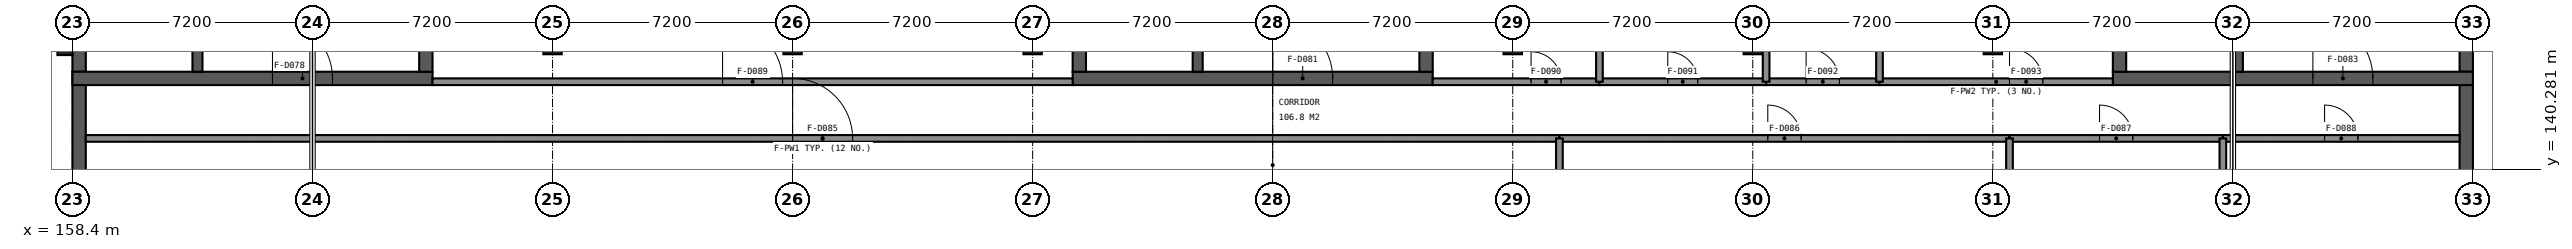
"""IFC4 building model, lengths in metres.
Left out: names, types, materials, properties, quantities, classifications, styles, units other than length and angle.
Written with IfcOpenShell. Run it as: python <this file> out.ifc"""

import sys

from ifc_helpers import new_model, si_unit, direction, frame, frame_2d, origin, origin_2d, place, context, subcontext, project, spatial, rectangle, extrude, element, fill, save


model = new_model("IFC4")
c1 = context("Model", 3, precision=1e-05, world=origin(), true_north=direction((0.0, 1.0)))
c2 = subcontext(c1, "Body", "Model", "MODEL_VIEW")
j1 = project(units=[si_unit("LENGTHUNIT", "METRE"), si_unit("PLANEANGLEUNIT", "RADIAN")], contexts=[c1])
p1 = place(None, origin())
s1 = spatial("IfcSite", under=j1, at=p1, CompositionType="ELEMENT")
p2 = place(p1, origin())
s2 = spatial("IfcBuilding", under=s1, at=p2, CompositionType="ELEMENT")
p3 = place(p2, frame((0.0, 0.0, 14.4)))
s3 = spatial("IfcBuildingStorey", under=s2, at=p3, CompositionType="ELEMENT", Elevation=14.4)
for number, where, z_axis, x_axis in (
    (1, (172.8, 144.0, 0.0), (0.0, 0.0, 1.0), (1.0, 0.0, 0.0)),
    (2, (180.0, 144.0, 0.0), (0.0, 0.0, 1.0), (1.0, 0.0, 0.0)),
    (3, (187.2, 144.0, 0.0), (0.0, 0.0, 1.0), (1.0, 0.0, 0.0)),
    (4, (201.6, 144.0, 0.0), (0.0, 0.0, 1.0), (1.0, 0.0, 0.0)),
    (5, (208.8, 144.0, 0.0), (0.0, 0.0, 1.0), (1.0, 0.0, 0.0)),
    (6, (216.0, 144.0, 0.0), (0.0, 0.0, 1.0), (1.0, 0.0, 0.0)),
):
    element("IfcColumn", number, at=place(p3, frame(where, z_axis=z_axis, x_axis=x_axis)), inside=s3, PredefinedType="COLUMN", context=c2, shape_type="SweptSolid", body=[
        extrude(rectangle(XDim=0.55, YDim=0.55, at=origin_2d()), origin(), (0.0, 0.0, 1.0), 4.8),
    ])
p4 = place(p3, frame((158.6, 137.075, 0.0), z_axis=(0.0, 0.0, 1.0), x_axis=(0.0, 1.0, 0.0)))
e7 = element("IfcWall", 7, at=p4, inside=s3, PredefinedType="SHEAR", context=c2, shape_type="SweptSolid", body=[
    extrude(rectangle(XDim=6.125, YDim=0.4, at=frame_2d((3.062, 0.0))), origin(), (0.0, 0.0, 1.0), 3.95),
])
p5 = place(p4, frame((1.262, 0.0, 1.8)))
e8 = element("IfcOpeningElement", 8, at=p5, cuts=e7, PredefinedType="OPENING", context=c2, shape_type="SweptSolid", body=[
    extrude(rectangle(XDim=1.2, YDim=1.2, at=frame_2d((0.6, 0.6))), frame((0.0, 0.21, 0.0), z_axis=(0.0, -1.0, 0.0), x_axis=(1.0, 0.0, 0.0)), (0.0, 0.0, 1.0), 0.42),
])
p6 = place(p3, frame((158.6, 143.2, 0.0), z_axis=(0.0, 0.0, 1.0), x_axis=(0.0, 1.0, 0.0)))
e9 = element("IfcWall", 9, at=p6, inside=s3, PredefinedType="SHEAR", context=c2, shape_type="SweptSolid", body=[
    extrude(rectangle(XDim=7.6, YDim=0.4, at=frame_2d((3.8, 0.0))), origin(), (0.0, 0.0, 1.0), 4.55),
])
p7 = place(p3, frame((230.2, 143.2, 0.0), z_axis=(0.0, 0.0, 1.0), x_axis=(0.0, -1.0, 0.0)))
e10 = element("IfcWall", 10, at=p7, inside=s3, PredefinedType="SHEAR", context=c2, shape_type="SweptSolid", body=[
    extrude(rectangle(XDim=6.125, YDim=0.4, at=frame_2d((3.062, 0.0))), origin(), (0.0, 0.0, 1.0), 3.95),
])
p8 = place(p7, frame((3.663, 0.0, 1.8)))
e11 = element("IfcOpeningElement", 11, at=p8, cuts=e10, PredefinedType="OPENING", context=c2, shape_type="SweptSolid", body=[
    extrude(rectangle(XDim=1.2, YDim=1.2, at=frame_2d((0.6, 0.6))), frame((0.0, 0.21, 0.0), z_axis=(0.0, -1.0, 0.0), x_axis=(1.0, 0.0, 0.0)), (0.0, 0.0, 1.0), 0.42),
])
p9 = place(p3, frame((230.2, 150.8, 0.0), z_axis=(0.0, 0.0, 1.0), x_axis=(0.0, -1.0, 0.0)))
e12 = element("IfcWall", 12, at=p9, inside=s3, PredefinedType="SHEAR", context=c2, shape_type="SweptSolid", body=[
    extrude(rectangle(XDim=7.6, YDim=0.4, at=frame_2d((3.8, 0.0))), origin(), (0.0, 0.0, 1.0), 4.55),
])
p10 = place(p3, frame((158.4, 143.0, 0.0), z_axis=(0.0, 0.0, 1.0), x_axis=(1.0, 0.0, 0.0)))
e13 = element("IfcWall", 13, at=p10, inside=s3, PredefinedType="SHEAR", context=c2, shape_type="SweptSolid", body=[
    extrude(rectangle(XDim=10.8, YDim=0.4, at=frame_2d((5.4, 0.0))), origin(), (0.0, 0.0, 1.0), 4.55),
])
p11 = place(p10, frame((6.0, 0.0, 0.0)))
e14 = element("IfcOpeningElement", 14, at=p11, cuts=e13, PredefinedType="OPENING", context=c2, shape_type="SweptSolid", body=[
    extrude(rectangle(XDim=1.8, YDim=2.1, at=frame_2d((0.9, 1.05))), frame((0.0, 0.21, 0.0), z_axis=(0.0, -1.0, 0.0), x_axis=(1.0, 0.0, 0.0)), (0.0, 0.0, 1.0), 0.42),
])
p12 = place(p3, frame((169.0, 143.2, 0.0), z_axis=(0.0, 0.0, 1.0), x_axis=(0.0, 1.0, 0.0)))
e15 = element("IfcWall", 15, at=p12, inside=s3, PredefinedType="SHEAR", context=c2, shape_type="SweptSolid", body=[
    extrude(rectangle(XDim=7.6, YDim=0.4, at=frame_2d((3.8, 0.0))), origin(), (0.0, 0.0, 1.0), 4.55),
])
p13 = place(p3, frame((162.15, 143.2, 0.0), z_axis=(0.0, 0.0, 1.0), x_axis=(0.0, 1.0, 0.0)))
e16 = element("IfcWall", 16, at=p13, inside=s3, PredefinedType="SHEAR", context=c2, shape_type="SweptSolid", body=[
    extrude(rectangle(XDim=7.6, YDim=0.3, at=frame_2d((3.8, 0.0))), origin(), (0.0, 0.0, 1.0), 4.55),
])
p14 = place(p13, frame((6.35, 0.0, 0.0)))
e17 = element("IfcOpeningElement", 17, at=p14, cuts=e16, PredefinedType="OPENING", context=c2, shape_type="SweptSolid", body=[
    extrude(rectangle(XDim=1.0, YDim=2.1, at=frame_2d((0.5, 1.05))), frame((0.0, 0.16, 0.0), z_axis=(0.0, -1.0, 0.0), x_axis=(1.0, 0.0, 0.0)), (0.0, 0.0, 1.0), 0.32),
])
p15 = place(p3, frame((188.4, 143.0, 0.0), z_axis=(0.0, 0.0, 1.0), x_axis=(1.0, 0.0, 0.0)))
e18 = element("IfcWall", 18, at=p15, inside=s3, PredefinedType="SHEAR", context=c2, shape_type="SweptSolid", body=[
    extrude(rectangle(XDim=10.8, YDim=0.4, at=frame_2d((5.4, 0.0))), origin(), (0.0, 0.0, 1.0), 4.55),
])
p16 = place(p15, frame((6.0, 0.0, 0.0)))
e19 = element("IfcOpeningElement", 19, at=p16, cuts=e18, PredefinedType="OPENING", context=c2, shape_type="SweptSolid", body=[
    extrude(rectangle(XDim=1.8, YDim=2.1, at=frame_2d((0.9, 1.05))), frame((0.0, 0.21, 0.0), z_axis=(0.0, -1.0, 0.0), x_axis=(1.0, 0.0, 0.0)), (0.0, 0.0, 1.0), 0.42),
])
for number, where, z_axis, x_axis in (
    (20, (188.6, 143.2, 0.0), (0.0, 0.0, 1.0), (0.0, 1.0, 0.0)),
    (21, (199.0, 143.2, 0.0), (0.0, 0.0, 1.0), (0.0, 1.0, 0.0)),
):
    element("IfcWall", number, at=place(p3, frame(where, z_axis=z_axis, x_axis=x_axis)), inside=s3, PredefinedType="SHEAR", context=c2, shape_type="SweptSolid", body=[
        extrude(rectangle(XDim=7.6, YDim=0.4, at=frame_2d((3.8, 0.0))), origin(), (0.0, 0.0, 1.0), 4.55),
    ])
p17 = place(p3, frame((192.15, 143.2, 0.0), z_axis=(0.0, 0.0, 1.0), x_axis=(0.0, 1.0, 0.0)))
e22 = element("IfcWall", 22, at=p17, inside=s3, PredefinedType="SHEAR", context=c2, shape_type="SweptSolid", body=[
    extrude(rectangle(XDim=7.6, YDim=0.3, at=frame_2d((3.8, 0.0))), origin(), (0.0, 0.0, 1.0), 4.55),
])
p18 = place(p17, frame((6.35, 0.0, 0.0)))
e23 = element("IfcOpeningElement", 23, at=p18, cuts=e22, PredefinedType="OPENING", context=c2, shape_type="SweptSolid", body=[
    extrude(rectangle(XDim=1.0, YDim=2.1, at=frame_2d((0.5, 1.05))), frame((0.0, 0.16, 0.0), z_axis=(0.0, -1.0, 0.0), x_axis=(1.0, 0.0, 0.0)), (0.0, 0.0, 1.0), 0.32),
])
p19 = place(p3, frame((219.6, 143.0, 0.0), z_axis=(0.0, 0.0, 1.0), x_axis=(1.0, 0.0, 0.0)))
e24 = element("IfcWall", 24, at=p19, inside=s3, PredefinedType="SHEAR", context=c2, shape_type="SweptSolid", body=[
    extrude(rectangle(XDim=10.8, YDim=0.4, at=frame_2d((5.4, 0.0))), origin(), (0.0, 0.0, 1.0), 4.55),
])
p20 = place(p19, frame((6.0, 0.0, 0.0)))
e25 = element("IfcOpeningElement", 25, at=p20, cuts=e24, PredefinedType="OPENING", context=c2, shape_type="SweptSolid", body=[
    extrude(rectangle(XDim=1.8, YDim=2.1, at=frame_2d((0.9, 1.05))), frame((0.0, 0.21, 0.0), z_axis=(0.0, -1.0, 0.0), x_axis=(1.0, 0.0, 0.0)), (0.0, 0.0, 1.0), 0.42),
])
p21 = place(p3, frame((219.8, 143.2, 0.0), z_axis=(0.0, 0.0, 1.0), x_axis=(0.0, 1.0, 0.0)))
e26 = element("IfcWall", 26, at=p21, inside=s3, PredefinedType="SHEAR", context=c2, shape_type="SweptSolid", body=[
    extrude(rectangle(XDim=7.6, YDim=0.4, at=frame_2d((3.8, 0.0))), origin(), (0.0, 0.0, 1.0), 4.55),
])
p22 = place(p3, frame((223.35, 143.2, 0.0), z_axis=(0.0, 0.0, 1.0), x_axis=(0.0, 1.0, 0.0)))
e27 = element("IfcWall", 27, at=p22, inside=s3, PredefinedType="SHEAR", context=c2, shape_type="SweptSolid", body=[
    extrude(rectangle(XDim=7.6, YDim=0.3, at=frame_2d((3.8, 0.0))), origin(), (0.0, 0.0, 1.0), 4.55),
])
p23 = place(p22, frame((6.35, 0.0, 0.0)))
e28 = element("IfcOpeningElement", 28, at=p23, cuts=e27, PredefinedType="OPENING", context=c2, shape_type="SweptSolid", body=[
    extrude(rectangle(XDim=1.0, YDim=2.1, at=frame_2d((0.5, 1.05))), frame((0.0, 0.16, 0.0), z_axis=(0.0, -1.0, 0.0), x_axis=(1.0, 0.0, 0.0)), (0.0, 0.0, 1.0), 0.32),
])
for number, where, z_axis, x_axis in (
    (29, (158.6, 130.0, 4.8), (0.0, 0.0, 1.0), (0.0, 1.0, 0.0)),
    (30, (230.2, 150.8, 4.8), (0.0, 0.0, 1.0), (0.0, -1.0, 0.0)),
):
    element("IfcWall", number, at=place(p3, frame(where, z_axis=z_axis, x_axis=x_axis)), inside=s3, PredefinedType="SOLIDWALL", context=c2, shape_type="SweptSolid", body=[
        extrude(rectangle(XDim=20.8, YDim=0.4, at=frame_2d((10.4, 0.0))), origin(), (0.0, 0.0, 1.0), 0.45),
    ])
p24 = place(p3, frame((158.175, 144.0, 0.0), z_axis=(0.0, 0.0, 1.0), x_axis=(0.0, 1.0, 0.0)))
e31 = element("IfcColumn", 31, at=p24, inside=s3, PredefinedType="PILASTER", context=c2, shape_type="SweptSolid", body=[
    extrude(rectangle(XDim=0.6, YDim=0.45, at=origin_2d()), origin(), (0.0, 0.0, 1.0), 4.05),
])
p25 = place(p3, frame((157.9, 129.6, 4.5), z_axis=(0.0, 0.0, 1.0), x_axis=(0.0, 1.0, 0.0)))
e32 = element("IfcWall", 32, at=p25, inside=s3, PredefinedType="SOLIDWALL", context=c2, shape_type="SweptSolid", body=[
    extrude(rectangle(XDim=21.6, YDim=0.2, at=frame_2d((10.8, 0.0))), origin(), (0.0, 0.0, 1.0), 0.45),
])
p26 = place(p3, frame((158.8, 141.2, 0.0), z_axis=(0.0, 0.0, 1.0), x_axis=(1.0, 0.0, 0.0)))
e33 = element("IfcWall", 33, at=p26, inside=s3, PredefinedType="PARTITIONING", context=c2, shape_type="SweptSolid", body=[
    extrude(rectangle(XDim=44.2, YDim=0.2, at=frame_2d((22.1, 0.0))), origin(), (0.0, 0.0, 1.0), 3.95),
])
p27 = place(p26, frame((21.2, 0.0, 0.0)))
e34 = element("IfcOpeningElement", 34, at=p27, cuts=e33, PredefinedType="OPENING", context=c2, shape_type="SweptSolid", body=[
    extrude(rectangle(XDim=1.8, YDim=2.1, at=frame_2d((0.9, 1.05))), frame((0.0, 0.11, 0.0), z_axis=(0.0, -1.0, 0.0), x_axis=(1.0, 0.0, 0.0)), (0.0, 0.0, 1.0), 0.22),
])
p28 = place(p3, frame((203.0, 141.2, 0.0), z_axis=(0.0, 0.0, 1.0), x_axis=(1.0, 0.0, 0.0)))
e35 = element("IfcWall", 35, at=p28, inside=s3, PredefinedType="PARTITIONING", context=c2, shape_type="SweptSolid", body=[
    extrude(rectangle(XDim=13.5, YDim=0.2, at=frame_2d((6.75, 0.0))), origin(), (0.0, 0.0, 1.0), 3.95),
])
p29 = place(p28, frame((6.25, 0.0, 0.0)))
e36 = element("IfcOpeningElement", 36, at=p29, cuts=e35, PredefinedType="OPENING", context=c2, shape_type="SweptSolid", body=[
    extrude(rectangle(XDim=1.0, YDim=2.1, at=frame_2d((0.5, 1.05))), frame((0.0, 0.11, 0.0), z_axis=(0.0, -1.0, 0.0), x_axis=(1.0, 0.0, 0.0)), (0.0, 0.0, 1.0), 0.22),
])
p30 = place(p3, frame((216.5, 141.2, 0.0), z_axis=(0.0, 0.0, 1.0), x_axis=(1.0, 0.0, 0.0)))
e37 = element("IfcWall", 37, at=p30, inside=s3, PredefinedType="PARTITIONING", context=c2, shape_type="SweptSolid", body=[
    extrude(rectangle(XDim=6.4, YDim=0.2, at=frame_2d((3.2, 0.0))), origin(), (0.0, 0.0, 1.0), 3.95),
])
p31 = place(p30, frame((2.7, 0.0, 0.0)))
e38 = element("IfcOpeningElement", 38, at=p31, cuts=e37, PredefinedType="OPENING", context=c2, shape_type="SweptSolid", body=[
    extrude(rectangle(XDim=1.0, YDim=2.1, at=frame_2d((0.5, 1.05))), frame((0.0, 0.11, 0.0), z_axis=(0.0, -1.0, 0.0), x_axis=(1.0, 0.0, 0.0)), (0.0, 0.0, 1.0), 0.22),
])
p32 = place(p3, frame((222.9, 141.2, 0.0), z_axis=(0.0, 0.0, 1.0), x_axis=(1.0, 0.0, 0.0)))
e39 = element("IfcWall", 39, at=p32, inside=s3, PredefinedType="PARTITIONING", context=c2, shape_type="SweptSolid", body=[
    extrude(rectangle(XDim=7.1, YDim=0.2, at=frame_2d((3.55, 0.0))), origin(), (0.0, 0.0, 1.0), 3.95),
])
p33 = place(p32, frame((3.05, 0.0, 0.0)))
e40 = element("IfcOpeningElement", 40, at=p33, cuts=e39, PredefinedType="OPENING", context=c2, shape_type="SweptSolid", body=[
    extrude(rectangle(XDim=1.0, YDim=2.1, at=frame_2d((0.5, 1.05))), frame((0.0, 0.11, 0.0), z_axis=(0.0, -1.0, 0.0), x_axis=(1.0, 0.0, 0.0)), (0.0, 0.0, 1.0), 0.22),
])
p34 = place(p3, frame((169.2, 142.9, 0.0), z_axis=(0.0, 0.0, 1.0), x_axis=(1.0, 0.0, 0.0)))
e41 = element("IfcWall", 41, at=p34, inside=s3, PredefinedType="PARTITIONING", context=c2, shape_type="SweptSolid", body=[
    extrude(rectangle(XDim=19.2, YDim=0.2, at=frame_2d((9.6, 0.0))), origin(), (0.0, 0.0, 1.0), 3.95),
])
p35 = place(p34, frame((8.7, 0.0, 0.0)))
e42 = element("IfcOpeningElement", 42, at=p35, cuts=e41, PredefinedType="OPENING", context=c2, shape_type="SweptSolid", body=[
    extrude(rectangle(XDim=1.8, YDim=2.1, at=frame_2d((0.9, 1.05))), frame((0.0, 0.11, 0.0), z_axis=(0.0, -1.0, 0.0), x_axis=(1.0, 0.0, 0.0)), (0.0, 0.0, 1.0), 0.22),
])
p36 = place(p3, frame((199.2, 142.9, 0.0), z_axis=(0.0, 0.0, 1.0), x_axis=(1.0, 0.0, 0.0)))
e43 = element("IfcWall", 43, at=p36, inside=s3, PredefinedType="PARTITIONING", context=c2, shape_type="SweptSolid", body=[
    extrude(rectangle(XDim=5.0, YDim=0.2, at=frame_2d((2.5, 0.0))), origin(), (0.0, 0.0, 1.0), 3.95),
])
p37 = place(p36, frame((2.95, 0.0, 0.0)))
e44 = element("IfcOpeningElement", 44, at=p37, cuts=e43, PredefinedType="OPENING", context=c2, shape_type="SweptSolid", body=[
    extrude(rectangle(XDim=0.9, YDim=2.1, at=frame_2d((0.45, 1.05))), frame((0.0, 0.11, 0.0), z_axis=(0.0, -1.0, 0.0), x_axis=(1.0, 0.0, 0.0)), (0.0, 0.0, 1.0), 0.22),
])
p38 = place(p3, frame((204.2, 142.9, 0.0), z_axis=(0.0, 0.0, 1.0), x_axis=(1.0, 0.0, 0.0)))
e45 = element("IfcWall", 45, at=p38, inside=s3, PredefinedType="PARTITIONING", context=c2, shape_type="SweptSolid", body=[
    extrude(rectangle(XDim=5.0, YDim=0.2, at=frame_2d((2.5, 0.0))), origin(), (0.0, 0.0, 1.0), 3.95),
])
p39 = place(p38, frame((2.05, 0.0, 0.0)))
e46 = element("IfcOpeningElement", 46, at=p39, cuts=e45, PredefinedType="OPENING", context=c2, shape_type="SweptSolid", body=[
    extrude(rectangle(XDim=0.9, YDim=2.1, at=frame_2d((0.45, 1.05))), frame((0.0, 0.11, 0.0), z_axis=(0.0, -1.0, 0.0), x_axis=(1.0, 0.0, 0.0)), (0.0, 0.0, 1.0), 0.22),
])
p40 = place(p3, frame((209.2, 142.9, 0.0), z_axis=(0.0, 0.0, 1.0), x_axis=(1.0, 0.0, 0.0)))
e47 = element("IfcWall", 47, at=p40, inside=s3, PredefinedType="PARTITIONING", context=c2, shape_type="SweptSolid", body=[
    extrude(rectangle(XDim=3.4, YDim=0.2, at=frame_2d((1.7, 0.0))), origin(), (0.0, 0.0, 1.0), 3.95),
])
p41 = place(p40, frame((1.2, 0.0, 0.0)))
e48 = element("IfcOpeningElement", 48, at=p41, cuts=e47, PredefinedType="OPENING", context=c2, shape_type="SweptSolid", body=[
    extrude(rectangle(XDim=1.0, YDim=2.1, at=frame_2d((0.5, 1.05))), frame((0.0, 0.11, 0.0), z_axis=(0.0, -1.0, 0.0), x_axis=(1.0, 0.0, 0.0)), (0.0, 0.0, 1.0), 0.22),
])
p42 = place(p3, frame((212.6, 142.9, 0.0), z_axis=(0.0, 0.0, 1.0), x_axis=(1.0, 0.0, 0.0)))
e49 = element("IfcWall", 49, at=p42, inside=s3, PredefinedType="PARTITIONING", context=c2, shape_type="SweptSolid", body=[
    extrude(rectangle(XDim=7.0, YDim=0.2, at=frame_2d((3.5, 0.0))), origin(), (0.0, 0.0, 1.0), 3.95),
])
p43 = place(p42, frame((3.9, 0.0, 0.0)))
e50 = element("IfcOpeningElement", 50, at=p43, cuts=e49, PredefinedType="OPENING", context=c2, shape_type="SweptSolid", body=[
    extrude(rectangle(XDim=1.0, YDim=2.1, at=frame_2d((0.5, 1.05))), frame((0.0, 0.11, 0.0), z_axis=(0.0, -1.0, 0.0), x_axis=(1.0, 0.0, 0.0)), (0.0, 0.0, 1.0), 0.22),
])
p44 = place(p3, frame((203.0, 130.0, 0.0), z_axis=(0.0, 0.0, 1.0), x_axis=(0.0, 1.0, 0.0)))
e51 = element("IfcWall", 51, at=p44, inside=s3, PredefinedType="PARTITIONING", context=c2, shape_type="SweptSolid", body=[
    extrude(rectangle(XDim=11.2, YDim=0.2, at=frame_2d((5.6, 0.0))), origin(), (0.0, 0.0, 1.0), 3.95),
])
for number, where, z_axis, x_axis in (
    (52, (204.2, 142.9, 0.0), (0.0, 0.0, 1.0), (0.0, 1.0, 0.0)),
    (53, (209.2, 142.9, 0.0), (0.0, 0.0, 1.0), (0.0, 1.0, 0.0)),
    (54, (212.6, 142.9, 0.0), (0.0, 0.0, 1.0), (0.0, 1.0, 0.0)),
):
    element("IfcWall", number, at=place(p3, frame(where, z_axis=z_axis, x_axis=x_axis)), inside=s3, PredefinedType="PARTITIONING", context=c2, shape_type="SweptSolid", body=[
        extrude(rectangle(XDim=7.9, YDim=0.2, at=frame_2d((3.95, 0.0))), origin(), (0.0, 0.0, 1.0), 3.95),
    ])
for number, where, z_axis, x_axis in (
    (55, (216.5, 130.0, 0.0), (0.0, 0.0, 1.0), (0.0, 1.0, 0.0)),
    (56, (222.9, 130.0, 0.0), (0.0, 0.0, 1.0), (0.0, 1.0, 0.0)),
):
    element("IfcWall", number, at=place(p3, frame(where, z_axis=z_axis, x_axis=x_axis)), inside=s3, PredefinedType="PARTITIONING", context=c2, shape_type="SweptSolid", body=[
        extrude(rectangle(XDim=11.2, YDim=0.2, at=frame_2d((5.6, 0.0))), origin(), (0.0, 0.0, 1.0), 3.95),
    ])
p45 = place(p11, origin())
e57 = element("IfcDoor", 57, at=p45, inside=s3, OperationType="NOTDEFINED", PredefinedType="DOOR", context=c2, shape_type="SweptSolid", body=[
    extrude(rectangle(XDim=1.8, YDim=2.1, at=frame_2d((0.9, 1.05))), frame((0.0, 0.025, 0.0), z_axis=(0.0, -1.0, 0.0), x_axis=(1.0, 0.0, 0.0)), (0.0, 0.0, 1.0), 0.05),
])
fill(e14, e57)
p46 = place(p16, origin())
e58 = element("IfcDoor", 58, at=p46, inside=s3, OperationType="NOTDEFINED", PredefinedType="DOOR", context=c2, shape_type="SweptSolid", body=[
    extrude(rectangle(XDim=1.8, YDim=2.1, at=frame_2d((0.9, 1.05))), frame((0.0, 0.025, 0.0), z_axis=(0.0, -1.0, 0.0), x_axis=(1.0, 0.0, 0.0)), (0.0, 0.0, 1.0), 0.05),
])
fill(e19, e58)
p47 = place(p20, origin())
e59 = element("IfcDoor", 59, at=p47, inside=s3, OperationType="NOTDEFINED", PredefinedType="DOOR", context=c2, shape_type="SweptSolid", body=[
    extrude(rectangle(XDim=1.8, YDim=2.1, at=frame_2d((0.9, 1.05))), frame((0.0, 0.025, 0.0), z_axis=(0.0, -1.0, 0.0), x_axis=(1.0, 0.0, 0.0)), (0.0, 0.0, 1.0), 0.05),
])
fill(e25, e59)
p48 = place(p27, origin())
e60 = element("IfcDoor", 60, at=p48, inside=s3, OperationType="NOTDEFINED", PredefinedType="DOOR", context=c2, shape_type="SweptSolid", body=[
    extrude(rectangle(XDim=1.8, YDim=2.1, at=frame_2d((0.9, 1.05))), frame((0.0, 0.025, 0.0), z_axis=(0.0, -1.0, 0.0), x_axis=(1.0, 0.0, 0.0)), (0.0, 0.0, 1.0), 0.05),
])
fill(e34, e60)
p49 = place(p29, origin())
e61 = element("IfcDoor", 61, at=p49, inside=s3, OperationType="NOTDEFINED", PredefinedType="DOOR", context=c2, shape_type="SweptSolid", body=[
    extrude(rectangle(XDim=1.0, YDim=2.1, at=frame_2d((0.5, 1.05))), frame((0.0, 0.025, 0.0), z_axis=(0.0, -1.0, 0.0), x_axis=(1.0, 0.0, 0.0)), (0.0, 0.0, 1.0), 0.05),
])
fill(e36, e61)
p50 = place(p31, origin())
e62 = element("IfcDoor", 62, at=p50, inside=s3, OperationType="NOTDEFINED", PredefinedType="DOOR", context=c2, shape_type="SweptSolid", body=[
    extrude(rectangle(XDim=1.0, YDim=2.1, at=frame_2d((0.5, 1.05))), frame((0.0, 0.025, 0.0), z_axis=(0.0, -1.0, 0.0), x_axis=(1.0, 0.0, 0.0)), (0.0, 0.0, 1.0), 0.05),
])
fill(e38, e62)
p51 = place(p33, origin())
e63 = element("IfcDoor", 63, at=p51, inside=s3, OperationType="NOTDEFINED", PredefinedType="DOOR", context=c2, shape_type="SweptSolid", body=[
    extrude(rectangle(XDim=1.0, YDim=2.1, at=frame_2d((0.5, 1.05))), frame((0.0, 0.025, 0.0), z_axis=(0.0, -1.0, 0.0), x_axis=(1.0, 0.0, 0.0)), (0.0, 0.0, 1.0), 0.05),
])
fill(e40, e63)
p52 = place(p35, origin())
e64 = element("IfcDoor", 64, at=p52, inside=s3, OperationType="NOTDEFINED", PredefinedType="DOOR", context=c2, shape_type="SweptSolid", body=[
    extrude(rectangle(XDim=1.8, YDim=2.1, at=frame_2d((0.9, 1.05))), frame((0.0, 0.025, 0.0), z_axis=(0.0, -1.0, 0.0), x_axis=(1.0, 0.0, 0.0)), (0.0, 0.0, 1.0), 0.05),
])
fill(e42, e64)
p53 = place(p37, origin())
e65 = element("IfcDoor", 65, at=p53, inside=s3, OperationType="NOTDEFINED", PredefinedType="DOOR", context=c2, shape_type="SweptSolid", body=[
    extrude(rectangle(XDim=0.9, YDim=2.1, at=frame_2d((0.45, 1.05))), frame((0.0, 0.025, 0.0), z_axis=(0.0, -1.0, 0.0), x_axis=(1.0, 0.0, 0.0)), (0.0, 0.0, 1.0), 0.05),
])
fill(e44, e65)
p54 = place(p39, origin())
e66 = element("IfcDoor", 66, at=p54, inside=s3, OperationType="NOTDEFINED", PredefinedType="DOOR", context=c2, shape_type="SweptSolid", body=[
    extrude(rectangle(XDim=0.9, YDim=2.1, at=frame_2d((0.45, 1.05))), frame((0.0, 0.025, 0.0), z_axis=(0.0, -1.0, 0.0), x_axis=(1.0, 0.0, 0.0)), (0.0, 0.0, 1.0), 0.05),
])
fill(e46, e66)
p55 = place(p41, origin())
e67 = element("IfcDoor", 67, at=p55, inside=s3, OperationType="NOTDEFINED", PredefinedType="DOOR", context=c2, shape_type="SweptSolid", body=[
    extrude(rectangle(XDim=1.0, YDim=2.1, at=frame_2d((0.5, 1.05))), frame((0.0, 0.025, 0.0), z_axis=(0.0, -1.0, 0.0), x_axis=(1.0, 0.0, 0.0)), (0.0, 0.0, 1.0), 0.05),
])
fill(e48, e67)
p56 = place(p43, origin())
e68 = element("IfcDoor", 68, at=p56, inside=s3, OperationType="NOTDEFINED", PredefinedType="DOOR", context=c2, shape_type="SweptSolid", body=[
    extrude(rectangle(XDim=1.0, YDim=2.1, at=frame_2d((0.5, 1.05))), frame((0.0, 0.025, 0.0), z_axis=(0.0, -1.0, 0.0), x_axis=(1.0, 0.0, 0.0)), (0.0, 0.0, 1.0), 0.05),
])
fill(e50, e68)
save(model, sys.argv[1])
